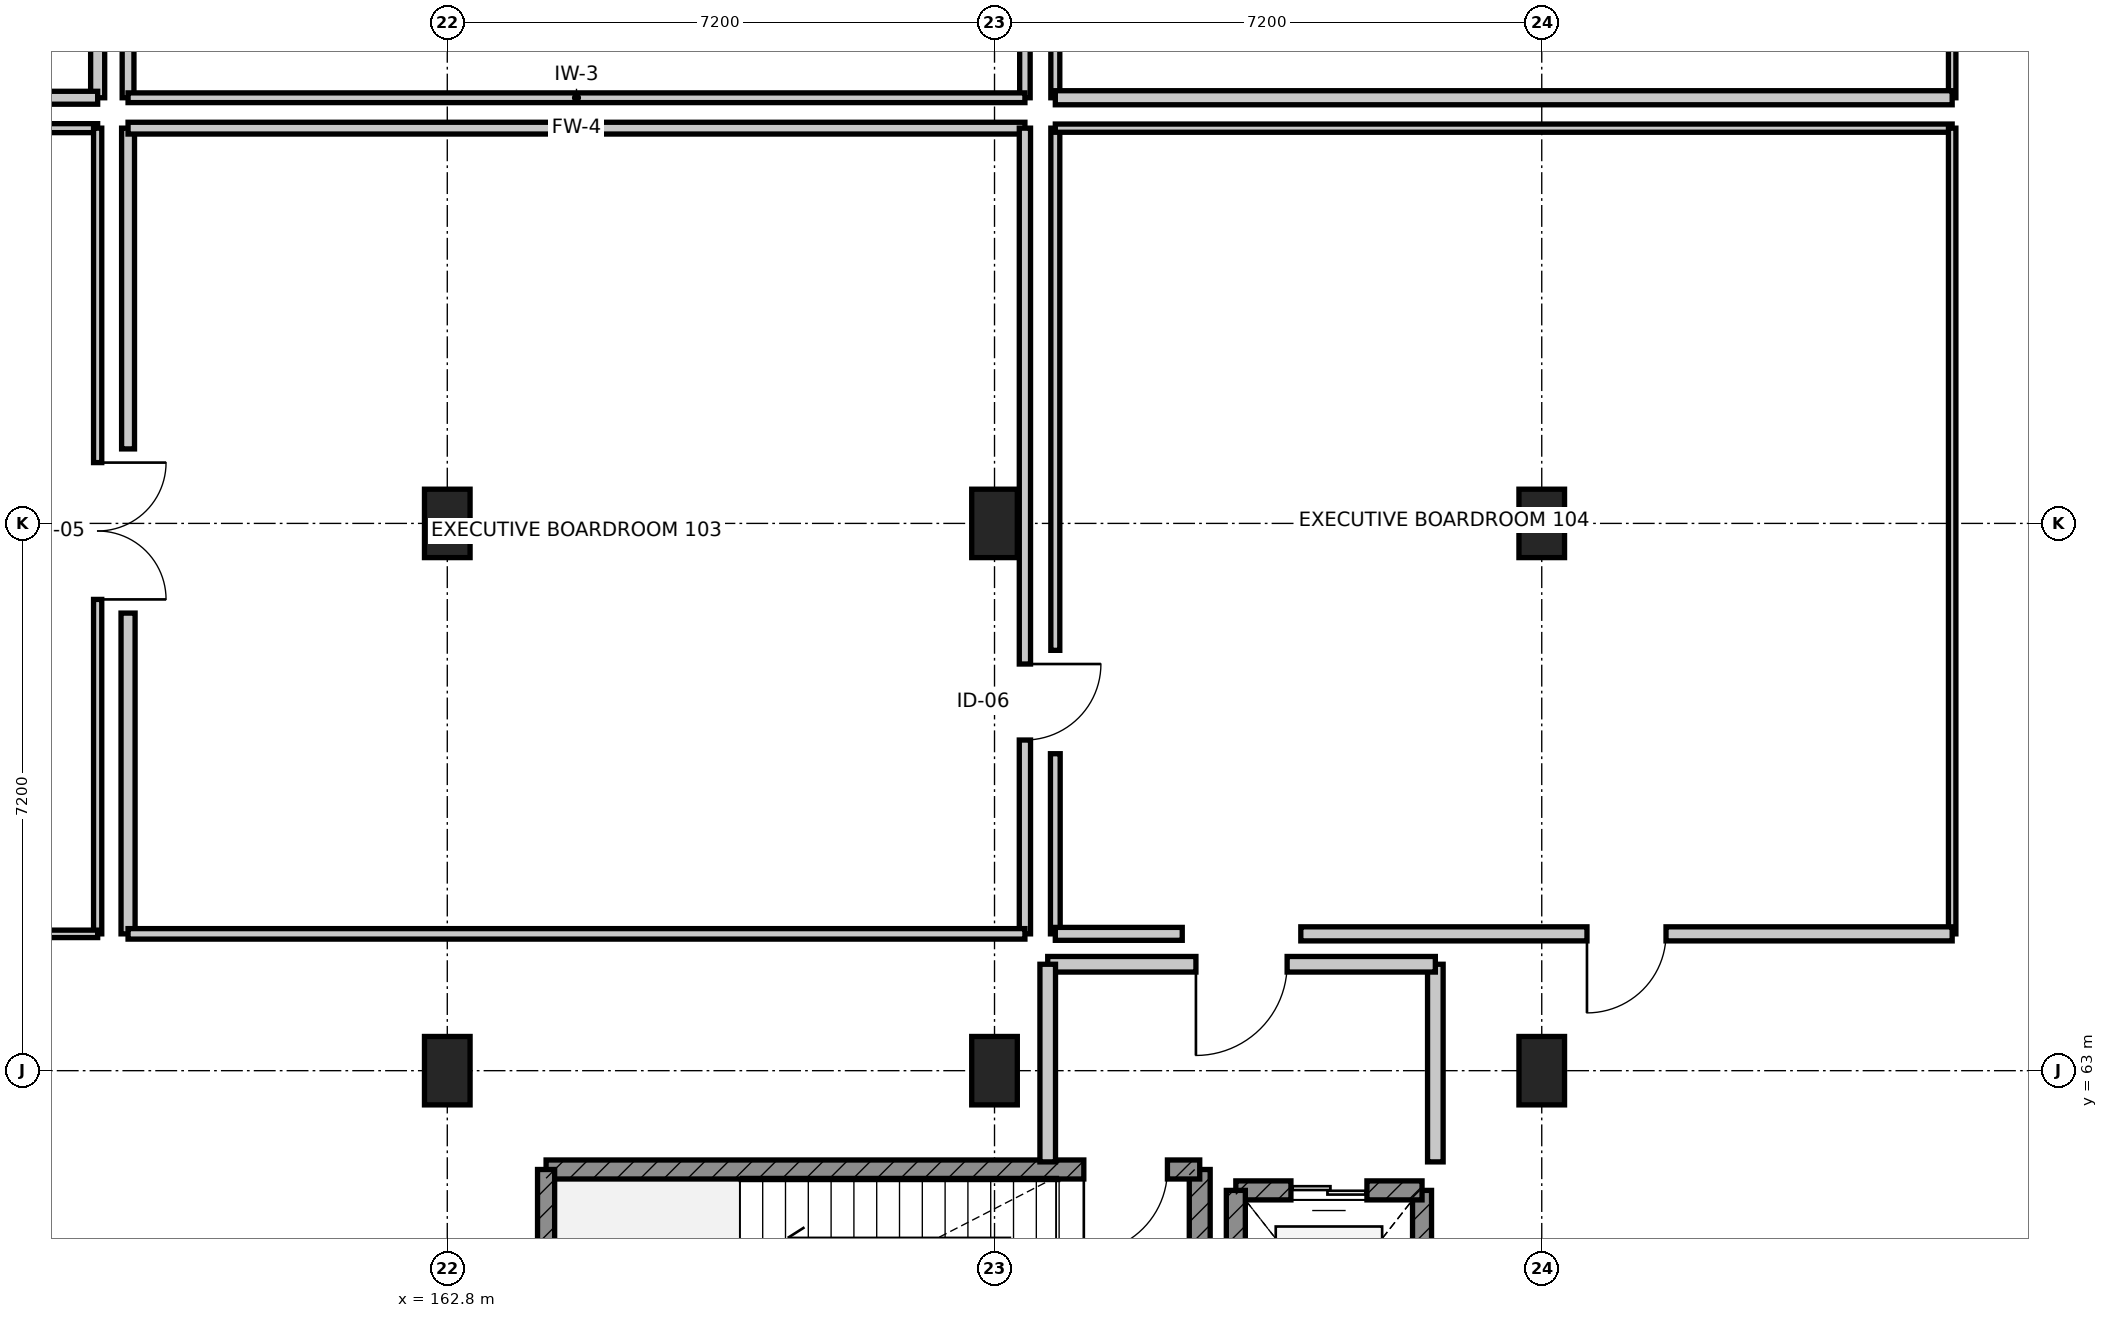
"""IFC4 building model, lengths in metres.
Left out: names, types, materials, properties, quantities, classifications, styles, units other than length and angle.
Written with IfcOpenShell. Run it as: python <this file> out.ifc"""

import sys

from ifc_helpers import new_model, si_unit, direction, frame, frame_2d, origin, origin_2d, place, context, subcontext, project, spatial, rectangle, extrude, element, fill, save


model = new_model("IFC4")
c1 = context("Model", 3, precision=1e-05, world=origin(), true_north=direction((0.0, 1.0)))
c2 = subcontext(c1, "Body", "Model", "MODEL_VIEW")
j1 = project(units=[si_unit("LENGTHUNIT", "METRE"), si_unit("PLANEANGLEUNIT", "RADIAN")], contexts=[c1])
p1 = place(None, origin())
s1 = spatial("IfcSite", under=j1, at=p1, CompositionType="ELEMENT")
p2 = place(p1, origin())
s2 = spatial("IfcBuilding", under=s1, at=p2, CompositionType="ELEMENT")
p3 = place(p2, frame((0.0, 0.0, 5.4)))
s3 = spatial("IfcBuildingStorey", under=s2, at=p3, CompositionType="ELEMENT", Elevation=5.4)
for number, where, z_axis, x_axis in (
    (1, (162.8, 63.0, 0.0), (0.0, 0.0, 1.0), (1.0, 0.0, 0.0)),
    (2, (162.8, 70.2, 0.0), (0.0, 0.0, 1.0), (1.0, 0.0, 0.0)),
    (3, (170.0, 63.0, 0.0), (0.0, 0.0, 1.0), (1.0, 0.0, 0.0)),
    (4, (170.0, 70.2, 0.0), (0.0, 0.0, 1.0), (1.0, 0.0, 0.0)),
    (5, (177.2, 63.0, 0.0), (0.0, 0.0, 1.0), (1.0, 0.0, 0.0)),
    (6, (177.2, 70.2, 0.0), (0.0, 0.0, 1.0), (1.0, 0.0, 0.0)),
):
    element("IfcColumn", number, at=place(p3, frame(where, z_axis=z_axis, x_axis=x_axis)), inside=s3, PredefinedType="COLUMN", context=c2, shape_type="SweptSolid", body=[
        extrude(rectangle(XDim=0.6, YDim=0.9, at=origin_2d()), origin(), (0.0, 0.0, 1.0), 5.1),
    ])
p4 = place(p3, frame((172.7, 58.1, 0.0), z_axis=(0.0, 0.0, 1.0), x_axis=(0.0, 1.0, 0.0)))
e7 = element("IfcWall", 7, at=p4, inside=s3, PredefinedType="SHEAR", context=c2, shape_type="SweptSolid", body=[
    extrude(rectangle(XDim=3.6, YDim=0.275, at=frame_2d((1.8, 0.0))), origin(), (0.0, 0.0, 1.0), 4.78),
])
p5 = place(p3, frame((172.7, 61.7, 0.0), z_axis=(0.0, 0.0, 1.0), x_axis=(-1.0, 0.0, 0.0)))
e8 = element("IfcWall", 8, at=p5, inside=s3, PredefinedType="SHEAR", context=c2, shape_type="SweptSolid", body=[
    extrude(rectangle(XDim=8.6, YDim=0.25, at=frame_2d((4.3, 0.0))), origin(), (0.0, 0.0, 1.0), 4.78),
])
p6 = place(p5, frame((0.425, 0.0, 0.0)))
e9 = element("IfcOpeningElement", 9, at=p6, cuts=e8, PredefinedType="OPENING", context=c2, shape_type="SweptSolid", body=[
    extrude(rectangle(XDim=1.1, YDim=2.1, at=frame_2d((0.55, 1.05))), frame((0.0, 0.135, 0.0), z_axis=(0.0, -1.0, 0.0), x_axis=(1.0, 0.0, 0.0)), (0.0, 0.0, 1.0), 0.27),
])
p7 = place(p3, frame((164.1, 61.7, 0.0), z_axis=(0.0, 0.0, 1.0), x_axis=(0.0, -1.0, 0.0)))
e10 = element("IfcWall", 10, at=p7, inside=s3, PredefinedType="SHEAR", context=c2, shape_type="SweptSolid", body=[
    extrude(rectangle(XDim=3.6, YDim=0.225, at=frame_2d((1.8, 0.0))), origin(), (0.0, 0.0, 1.0), 4.78),
])
p8 = place(p3, frame((175.625, 58.375, 0.0), z_axis=(0.0, 0.0, 1.0), x_axis=(0.0, 1.0, 0.0)))
e11 = element("IfcWall", 11, at=p8, inside=s3, PredefinedType="SHEAR", context=c2, shape_type="SweptSolid", body=[
    extrude(rectangle(XDim=3.05, YDim=0.25, at=frame_2d((1.525, 0.0))), origin(), (0.0, 0.0, 1.0), 4.78),
])
p9 = place(p3, frame((175.625, 61.425, 0.0), z_axis=(0.0, 0.0, 1.0), x_axis=(-1.0, 0.0, 0.0)))
e12 = element("IfcWall", 12, at=p9, inside=s3, PredefinedType="SHEAR", context=c2, shape_type="SweptSolid", body=[
    extrude(rectangle(XDim=2.45, YDim=0.25, at=frame_2d((1.225, 0.0))), origin(), (0.0, 0.0, 1.0), 4.78),
])
p10 = place(p9, frame((0.725, 0.0, 0.0)))
e13 = element("IfcOpeningElement", 13, at=p10, cuts=e12, PredefinedType="OPENING", context=c2, shape_type="SweptSolid", body=[
    extrude(rectangle(XDim=1.0, YDim=2.15, at=frame_2d((0.5, 1.075))), frame((0.0, 0.135, 0.0), z_axis=(0.0, -1.0, 0.0), x_axis=(1.0, 0.0, 0.0)), (0.0, 0.0, 1.0), 0.27),
])
p11 = place(p3, frame((173.175, 61.425, 0.0), z_axis=(0.0, 0.0, 1.0), x_axis=(0.0, -1.0, 0.0)))
e14 = element("IfcWall", 14, at=p11, inside=s3, PredefinedType="SHEAR", context=c2, shape_type="SweptSolid", body=[
    extrude(rectangle(XDim=3.05, YDim=0.25, at=frame_2d((1.525, 0.0))), origin(), (0.0, 0.0, 1.0), 4.78),
])
p12 = place(p3, frame((175.8, 61.8, 0.0), z_axis=(0.0, 0.0, 1.0), x_axis=(0.0, 1.0, 0.0)))
e15 = element("IfcWall", 15, at=p12, inside=s3, PredefinedType="PARTITIONING", context=c2, shape_type="SweptSolid", body=[
    extrude(rectangle(XDim=2.6, YDim=0.205, at=frame_2d((1.3, 0.0))), origin(), (0.0, 0.0, 1.0), 4.115),
])
p13 = place(p3, frame((175.8, 64.4, 0.0), z_axis=(0.0, 0.0, 1.0), x_axis=(-1.0, 0.0, 0.0)))
e16 = element("IfcWall", 16, at=p13, inside=s3, PredefinedType="PARTITIONING", context=c2, shape_type="SweptSolid", body=[
    extrude(rectangle(XDim=5.1, YDim=0.205, at=frame_2d((2.55, 0.0))), origin(), (0.0, 0.0, 1.0), 4.78),
])
p14 = place(p13, frame((1.95, 0.0, 0.0)))
e17 = element("IfcOpeningElement", 17, at=p14, cuts=e16, PredefinedType="OPENING", context=c2, shape_type="SweptSolid", body=[
    extrude(rectangle(XDim=1.2, YDim=2.1, at=frame_2d((0.6, 1.05))), frame((0.0, 0.113, 0.0), z_axis=(0.0, -1.0, 0.0), x_axis=(1.0, 0.0, 0.0)), (0.0, 0.0, 1.0), 0.225),
])
p15 = place(p3, frame((170.7, 64.4, 0.0), z_axis=(0.0, 0.0, 1.0), x_axis=(0.0, -1.0, 0.0)))
e18 = element("IfcWall", 18, at=p15, inside=s3, PredefinedType="PARTITIONING", context=c2, shape_type="SweptSolid", body=[
    extrude(rectangle(XDim=2.6, YDim=0.205, at=frame_2d((1.3, 0.0))), origin(), (0.0, 0.0, 1.0), 4.115),
])
p16 = place(p3, frame((146.4, 75.4, 0.0), z_axis=(0.0, 0.0, 1.0), x_axis=(1.0, 0.0, 0.0)))
e19 = element("IfcWall", 19, at=p16, inside=s3, PredefinedType="PARTITIONING", context=c2, shape_type="SweptSolid", body=[
    extrude(rectangle(XDim=11.8, YDim=0.118, at=frame_2d((5.9, 0.0))), origin(), (0.0, 0.0, 1.0), 4.229),
])
p17 = place(p3, frame((158.2, 75.4, 0.0), z_axis=(0.0, 0.0, 1.0), x_axis=(0.0, -1.0, 0.0)))
e20 = element("IfcWall", 20, at=p17, inside=s3, PredefinedType="PARTITIONING", context=c2, shape_type="SweptSolid", body=[
    extrude(rectangle(XDim=10.6, YDim=0.108, at=frame_2d((5.3, 0.0))), origin(), (0.0, 0.0, 1.0), 4.115),
])
p18 = place(p17, frame((4.4, 0.0, 0.0)))
e21 = element("IfcOpeningElement", 21, at=p18, cuts=e20, PredefinedType="OPENING", context=c2, shape_type="SweptSolid", body=[
    extrude(rectangle(XDim=1.8, YDim=2.2, at=frame_2d((0.9, 1.1))), frame((0.0, 0.064, 0.0), z_axis=(0.0, -1.0, 0.0), x_axis=(1.0, 0.0, 0.0)), (0.0, 0.0, 1.0), 0.128),
])
p19 = place(p3, frame((158.2, 64.8, 0.0), z_axis=(0.0, 0.0, 1.0), x_axis=(-1.0, 0.0, 0.0)))
e22 = element("IfcWall", 22, at=p19, inside=s3, PredefinedType="PARTITIONING", context=c2, shape_type="SweptSolid", body=[
    extrude(rectangle(XDim=11.8, YDim=0.098, at=frame_2d((5.9, 0.0))), origin(), (0.0, 0.0, 1.0), 4.229),
])
p20 = place(p3, frame((158.6, 64.8, 0.0), z_axis=(0.0, 0.0, 1.0), x_axis=(0.0, 1.0, 0.0)))
e23 = element("IfcWall", 23, at=p20, inside=s3, PredefinedType="PARTITIONING", context=c2, shape_type="SweptSolid", body=[
    extrude(rectangle(XDim=4.22, YDim=0.185, at=frame_2d((2.11, 0.0))), origin(), (0.0, 0.0, 1.0), 4.407),
])
p21 = place(p3, frame((158.6, 71.18, 0.0), z_axis=(0.0, 0.0, 1.0), x_axis=(0.0, 1.0, 0.0)))
e24 = element("IfcWall", 24, at=p21, inside=s3, PredefinedType="PARTITIONING", context=c2, shape_type="SweptSolid", body=[
    extrude(rectangle(XDim=4.22, YDim=0.17, at=frame_2d((2.11, 0.0))), origin(), (0.0, 0.0, 1.0), 4.407),
])
p22 = place(p3, frame((158.6, 75.4, 0.0), z_axis=(0.0, 0.0, 1.0), x_axis=(1.0, 0.0, 0.0)))
e25 = element("IfcWall", 25, at=p22, inside=s3, PredefinedType="PARTITIONING", context=c2, shape_type="SweptSolid", body=[
    extrude(rectangle(XDim=11.8, YDim=0.155, at=frame_2d((5.9, 0.0))), origin(), (0.0, 0.0, 1.0), 4.229),
])
p23 = place(p3, frame((170.4, 75.4, 0.0), z_axis=(0.0, 0.0, 1.0), x_axis=(0.0, -1.0, 0.0)))
e26 = element("IfcWall", 26, at=p23, inside=s3, PredefinedType="PARTITIONING", context=c2, shape_type="SweptSolid", body=[
    extrude(rectangle(XDim=10.6, YDim=0.148, at=frame_2d((5.3, 0.0))), origin(), (0.0, 0.0, 1.0), 4.115),
])
p24 = place(p23, frame((7.05, 0.0, 0.0)))
e27 = element("IfcOpeningElement", 27, at=p24, cuts=e26, PredefinedType="OPENING", context=c2, shape_type="SweptSolid", body=[
    extrude(rectangle(XDim=1.0, YDim=2.1, at=frame_2d((0.5, 1.05))), frame((0.0, 0.084, 0.0), z_axis=(0.0, -1.0, 0.0), x_axis=(1.0, 0.0, 0.0)), (0.0, 0.0, 1.0), 0.168),
])
p25 = place(p3, frame((170.4, 64.8, 0.0), z_axis=(0.0, 0.0, 1.0), x_axis=(-1.0, 0.0, 0.0)))
e28 = element("IfcWall", 28, at=p25, inside=s3, PredefinedType="PARTITIONING", context=c2, shape_type="SweptSolid", body=[
    extrude(rectangle(XDim=11.8, YDim=0.138, at=frame_2d((5.9, 0.0))), origin(), (0.0, 0.0, 1.0), 4.229),
])
p26 = place(p3, frame((170.8, 64.8, 0.0), z_axis=(0.0, 0.0, 1.0), x_axis=(0.0, 1.0, 0.0)))
e29 = element("IfcWall", 29, at=p26, inside=s3, PredefinedType="PARTITIONING", context=c2, shape_type="SweptSolid", body=[
    extrude(rectangle(XDim=2.37, YDim=0.128, at=frame_2d((1.185, 0.0))), origin(), (0.0, 0.0, 1.0), 4.407),
])
p27 = place(p3, frame((170.8, 68.53, 0.0), z_axis=(0.0, 0.0, 1.0), x_axis=(0.0, 1.0, 0.0)))
e30 = element("IfcWall", 30, at=p27, inside=s3, PredefinedType="PARTITIONING", context=c2, shape_type="SweptSolid", body=[
    extrude(rectangle(XDim=6.87, YDim=0.118, at=frame_2d((3.435, 0.0))), origin(), (0.0, 0.0, 1.0), 4.115),
])
p28 = place(p3, frame((170.8, 75.4, 0.0), z_axis=(0.0, 0.0, 1.0), x_axis=(1.0, 0.0, 0.0)))
e31 = element("IfcWall", 31, at=p28, inside=s3, PredefinedType="PARTITIONING", context=c2, shape_type="SweptSolid", body=[
    extrude(rectangle(XDim=11.8, YDim=0.108, at=frame_2d((5.9, 0.0))), origin(), (0.0, 0.0, 1.0), 4.229),
])
p29 = place(p3, frame((182.6, 75.4, 0.0), z_axis=(0.0, 0.0, 1.0), x_axis=(0.0, -1.0, 0.0)))
e32 = element("IfcWall", 32, at=p29, inside=s3, PredefinedType="PARTITIONING", context=c2, shape_type="SweptSolid", body=[
    extrude(rectangle(XDim=10.6, YDim=0.098, at=frame_2d((5.3, 0.0))), origin(), (0.0, 0.0, 1.0), 4.115),
])
p30 = place(p3, frame((182.6, 64.8, 0.0), z_axis=(0.0, 0.0, 1.0), x_axis=(-1.0, 0.0, 0.0)))
e33 = element("IfcWall", 33, at=p30, inside=s3, PredefinedType="PARTITIONING", context=c2, shape_type="SweptSolid", body=[
    extrude(rectangle(XDim=8.57, YDim=0.185, at=frame_2d((4.285, 0.0))), origin(), (0.0, 0.0, 1.0), 4.229),
])
p31 = place(p30, frame((3.765, 0.0, 0.0)))
e34 = element("IfcOpeningElement", 34, at=p31, cuts=e33, PredefinedType="OPENING", context=c2, shape_type="SweptSolid", body=[
    extrude(rectangle(XDim=1.04, YDim=2.12, at=frame_2d((0.52, 1.06))), frame((0.0, 0.103, 0.0), z_axis=(0.0, -1.0, 0.0), x_axis=(1.0, 0.0, 0.0)), (0.0, 0.0, 1.0), 0.205),
])
p32 = place(p3, frame((172.47, 64.8, 0.0), z_axis=(0.0, 0.0, 1.0), x_axis=(-1.0, 0.0, 0.0)))
e35 = element("IfcWall", 35, at=p32, inside=s3, PredefinedType="PARTITIONING", context=c2, shape_type="SweptSolid", body=[
    extrude(rectangle(XDim=1.67, YDim=0.17, at=frame_2d((0.835, 0.0))), origin(), (0.0, 0.0, 1.0), 4.78),
])
p33 = place(p3, frame((158.2, 86.4, 0.0), z_axis=(0.0, 0.0, 1.0), x_axis=(0.0, -1.0, 0.0)))
e36 = element("IfcWall", 36, at=p33, inside=s3, PredefinedType="PARTITIONING", context=c2, shape_type="SweptSolid", body=[
    extrude(rectangle(XDim=10.6, YDim=0.185, at=frame_2d((5.3, 0.0))), origin(), (0.0, 0.0, 1.0), 4.115),
])
p34 = place(p3, frame((158.2, 75.8, 0.0), z_axis=(0.0, 0.0, 1.0), x_axis=(-1.0, 0.0, 0.0)))
e37 = element("IfcWall", 37, at=p34, inside=s3, PredefinedType="PARTITIONING", context=c2, shape_type="SweptSolid", body=[
    extrude(rectangle(XDim=11.8, YDim=0.17, at=frame_2d((5.9, 0.0))), origin(), (0.0, 0.0, 1.0), 4.229),
])
p35 = place(p3, frame((158.6, 75.8, 0.0), z_axis=(0.0, 0.0, 1.0), x_axis=(0.0, 1.0, 0.0)))
e38 = element("IfcWall", 38, at=p35, inside=s3, PredefinedType="PARTITIONING", context=c2, shape_type="SweptSolid", body=[
    extrude(rectangle(XDim=10.6, YDim=0.155, at=frame_2d((5.3, 0.0))), origin(), (0.0, 0.0, 1.0), 4.115),
])
p36 = place(p3, frame((170.4, 86.4, 0.0), z_axis=(0.0, 0.0, 1.0), x_axis=(0.0, -1.0, 0.0)))
e39 = element("IfcWall", 39, at=p36, inside=s3, PredefinedType="PARTITIONING", context=c2, shape_type="SweptSolid", body=[
    extrude(rectangle(XDim=10.6, YDim=0.138, at=frame_2d((5.3, 0.0))), origin(), (0.0, 0.0, 1.0), 4.115),
])
p37 = place(p3, frame((170.4, 75.8, 0.0), z_axis=(0.0, 0.0, 1.0), x_axis=(-1.0, 0.0, 0.0)))
e40 = element("IfcWall", 40, at=p37, inside=s3, PredefinedType="PARTITIONING", context=c2, shape_type="SweptSolid", body=[
    extrude(rectangle(XDim=11.8, YDim=0.128, at=frame_2d((5.9, 0.0))), origin(), (0.0, 0.0, 1.0), 4.229),
])
p38 = place(p3, frame((170.8, 75.8, 0.0), z_axis=(0.0, 0.0, 1.0), x_axis=(0.0, 1.0, 0.0)))
e41 = element("IfcWall", 41, at=p38, inside=s3, PredefinedType="PARTITIONING", context=c2, shape_type="SweptSolid", body=[
    extrude(rectangle(XDim=10.6, YDim=0.118, at=frame_2d((5.3, 0.0))), origin(), (0.0, 0.0, 1.0), 4.115),
])
p39 = place(p3, frame((182.6, 86.4, 0.0), z_axis=(0.0, 0.0, 1.0), x_axis=(0.0, -1.0, 0.0)))
e42 = element("IfcWall", 42, at=p39, inside=s3, PredefinedType="PARTITIONING", context=c2, shape_type="SweptSolid", body=[
    extrude(rectangle(XDim=10.6, YDim=0.098, at=frame_2d((5.3, 0.0))), origin(), (0.0, 0.0, 1.0), 4.115),
])
p40 = place(p39, frame((4.815, 0.0, 0.0)))
e43 = element("IfcOpeningElement", 43, at=p40, cuts=e42, PredefinedType="OPENING", context=c2, shape_type="SweptSolid", body=[
    extrude(rectangle(XDim=0.97, YDim=2.16, at=frame_2d((0.485, 1.08))), frame((0.0, 0.059, 0.0), z_axis=(0.0, -1.0, 0.0), x_axis=(1.0, 0.0, 0.0)), (0.0, 0.0, 1.0), 0.118),
])
p41 = place(p3, frame((182.6, 75.8, 0.0), z_axis=(0.0, 0.0, 1.0), x_axis=(-1.0, 0.0, 0.0)))
e44 = element("IfcWall", 44, at=p41, inside=s3, PredefinedType="PARTITIONING", context=c2, shape_type="SweptSolid", body=[
    extrude(rectangle(XDim=11.8, YDim=0.185, at=frame_2d((5.9, 0.0))), origin(), (0.0, 0.0, 1.0), 4.229),
])
p42 = place(p6, origin())
e45 = element("IfcDoor", 45, at=p42, inside=s3, OperationType="SINGLE_SWING_RIGHT", PredefinedType="DOOR", context=c2, shape_type="SweptSolid", body=[
    extrude(rectangle(XDim=1.1, YDim=2.1, at=frame_2d((0.55, 1.05))), frame((0.0, 0.025, 0.0), z_axis=(0.0, -1.0, 0.0), x_axis=(1.0, 0.0, 0.0)), (0.0, 0.0, 1.0), 0.05),
])
fill(e9, e45)
p43 = place(p10, origin())
e46 = element("IfcDoor", 46, at=p43, inside=s3, OperationType="DOUBLE_DOOR_SLIDING", PredefinedType="DOOR", context=c2, shape_type="SweptSolid", body=[
    extrude(rectangle(XDim=1.0, YDim=2.15, at=frame_2d((0.5, 1.075))), frame((0.0, 0.025, 0.0), z_axis=(0.0, -1.0, 0.0), x_axis=(1.0, 0.0, 0.0)), (0.0, 0.0, 1.0), 0.05),
])
fill(e13, e46)
p44 = place(p14, origin())
e47 = element("IfcDoor", 47, at=p44, inside=s3, OperationType="SINGLE_SWING_RIGHT", PredefinedType="DOOR", context=c2, shape_type="SweptSolid", body=[
    extrude(rectangle(XDim=1.2, YDim=2.1, at=frame_2d((0.6, 1.05))), frame((0.0, 0.025, 0.0), z_axis=(0.0, -1.0, 0.0), x_axis=(1.0, 0.0, 0.0)), (0.0, 0.0, 1.0), 0.05),
])
fill(e17, e47)
p45 = place(p18, origin())
e48 = element("IfcDoor", 48, at=p45, inside=s3, OperationType="DOUBLE_DOOR_SINGLE_SWING", PredefinedType="DOOR", context=c2, shape_type="SweptSolid", body=[
    extrude(rectangle(XDim=1.8, YDim=2.2, at=frame_2d((0.9, 1.1))), frame((0.0, 0.025, 0.0), z_axis=(0.0, -1.0, 0.0), x_axis=(1.0, 0.0, 0.0)), (0.0, 0.0, 1.0), 0.05),
])
fill(e21, e48)
p46 = place(p24, origin())
e49 = element("IfcDoor", 49, at=p46, inside=s3, OperationType="SINGLE_SWING_LEFT", PredefinedType="DOOR", context=c2, shape_type="SweptSolid", body=[
    extrude(rectangle(XDim=1.0, YDim=2.1, at=frame_2d((0.5, 1.05))), frame((0.0, 0.025, 0.0), z_axis=(0.0, -1.0, 0.0), x_axis=(1.0, 0.0, 0.0)), (0.0, 0.0, 1.0), 0.05),
])
fill(e27, e49)
p47 = place(p31, origin())
e50 = element("IfcDoor", 50, at=p47, inside=s3, OperationType="SINGLE_SWING_RIGHT", PredefinedType="DOOR", context=c2, shape_type="SweptSolid", body=[
    extrude(rectangle(XDim=1.04, YDim=2.12, at=frame_2d((0.52, 1.06))), frame((0.0, 0.025, 0.0), z_axis=(0.0, -1.0, 0.0), x_axis=(1.0, 0.0, 0.0)), (0.0, 0.0, 1.0), 0.05),
])
fill(e34, e50)
save(model, sys.argv[1])
